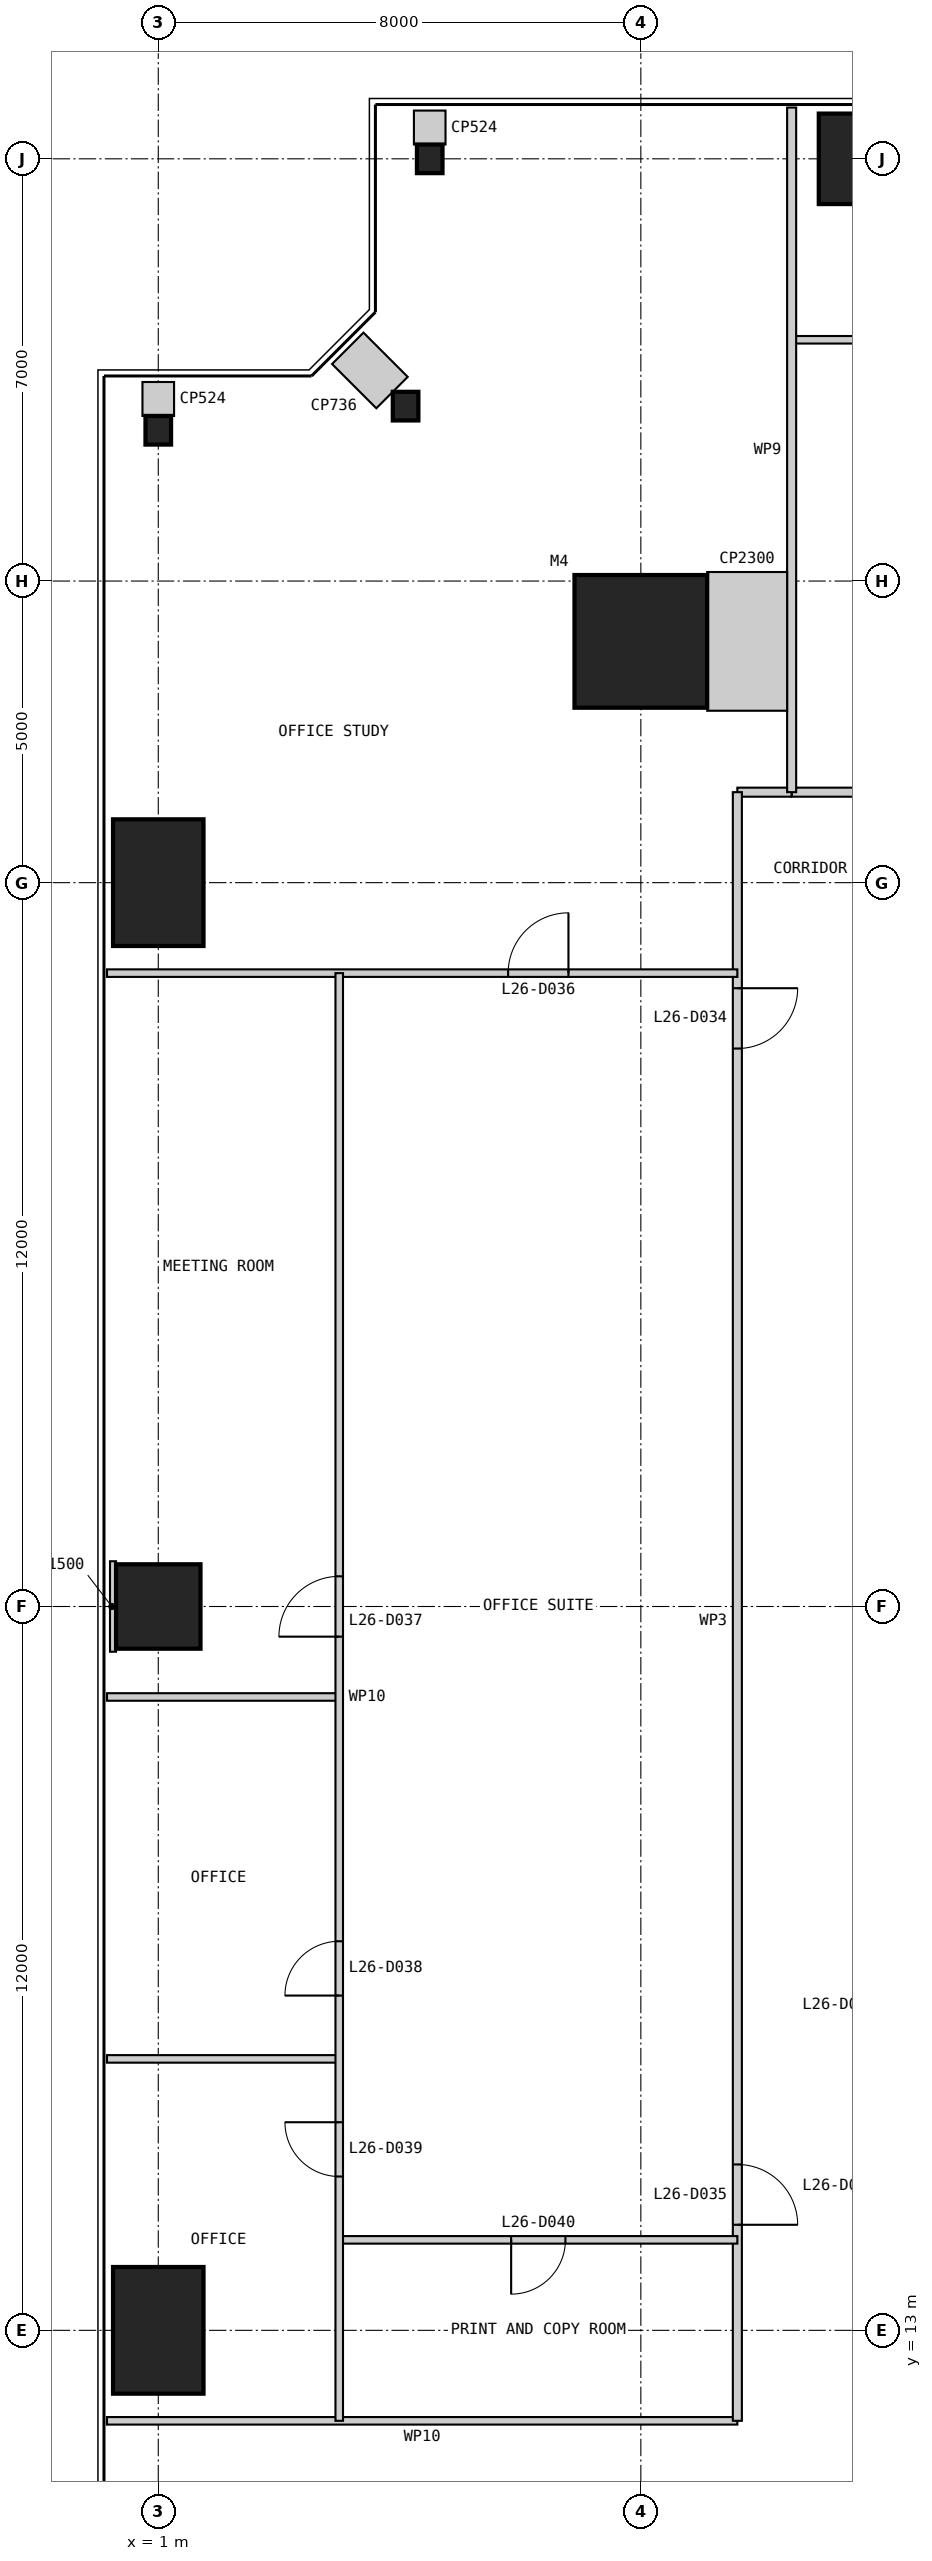
"""IFC4 building model, lengths in metres.
Left out: names, types, materials, properties, quantities, classifications, styles, units other than length and angle.
Written with IfcOpenShell. Run it as: python <this file> out.ifc"""

import sys

from ifc_helpers import new_model, si_unit, direction, frame, frame_2d, origin, origin_2d, place, context, subcontext, project, spatial, rectangle, i_section, extrude, element, fill, save


model = new_model("IFC4")
c1 = context("Model", 3, precision=1e-05, world=origin(), true_north=direction((0.0, 1.0)))
c2 = subcontext(c1, "Body", "Model", "MODEL_VIEW")
j1 = project(units=[si_unit("LENGTHUNIT", "METRE"), si_unit("PLANEANGLEUNIT", "RADIAN")], contexts=[c1])
p1 = place(None, origin())
s1 = spatial("IfcSite", under=j1, at=p1, CompositionType="ELEMENT")
p2 = place(p1, origin())
s2 = spatial("IfcBuilding", under=s1, at=p2, CompositionType="ELEMENT")
p3 = place(p2, frame((0.0, 0.0, 114.4)))
s3 = spatial("IfcBuildingStorey", under=s2, at=p3, CompositionType="ELEMENT", Elevation=114.4)
p4 = place(p3, frame((9.0, 41.0, 0.0), z_axis=(0.0, 0.0, 1.0), x_axis=(1.0, 0.0, 0.0)))
e1 = element("IfcColumn", 1, at=p4, inside=s3, PredefinedType="COLUMN", context=c2, shape_type="SweptSolid", body=[
    extrude(rectangle(XDim=2.2, YDim=2.2, at=origin_2d()), origin(), (0.0, 0.0, 1.0), 4.0),
])
p5 = place(p3, frame((13.0, 49.0, 0.0), z_axis=(0.0, 0.0, 1.0), x_axis=(1.0, 0.0, 0.0)))
e2 = element("IfcColumn", 2, at=p5, inside=s3, PredefinedType="COLUMN", context=c2, shape_type="SweptSolid", body=[
    extrude(rectangle(XDim=2.1, YDim=1.5, at=origin_2d()), origin(), (0.0, 0.0, 1.0), 4.0),
])
for number, where, z_axis, x_axis in (
    (3, (5.5, 49.0, 0.0), (0.0, 0.0, 1.0), (1.0, 0.0, 0.0)),
    (4, (5.1, 44.9, 0.0), (0.0, 0.0, 1.0), (1.0, 0.0, 0.0)),
    (5, (1.0, 44.5, 0.0), (0.0, 0.0, 1.0), (1.0, 0.0, 0.0)),
):
    element("IfcColumn", number, at=place(p3, frame(where, z_axis=z_axis, x_axis=x_axis)), inside=s3, PredefinedType="COLUMN", context=c2, shape_type="SweptSolid", body=[
        extrude(i_section(OverallWidth=0.424, OverallDepth=0.475, WebThickness=0.048, FlangeThickness=0.077, at=origin_2d()), origin(), (0.0, 0.0, 1.0), 4.0),
    ])
p6 = place(p3, frame((1.0, 37.0, 0.0), z_axis=(0.0, 0.0, 1.0), x_axis=(1.0, 0.0, 0.0)))
e6 = element("IfcColumn", 6, at=p6, inside=s3, PredefinedType="COLUMN", context=c2, shape_type="SweptSolid", body=[
    extrude(rectangle(XDim=1.5, YDim=2.1, at=origin_2d()), origin(), (0.0, 0.0, 1.0), 4.0),
])
p7 = place(p3, frame((1.0, 25.0, 0.0), z_axis=(0.0, 0.0, 1.0), x_axis=(1.0, 0.0, 0.0)))
e7 = element("IfcColumn", 7, at=p7, inside=s3, PredefinedType="COLUMN", context=c2, shape_type="SweptSolid", body=[
    extrude(rectangle(XDim=1.4, YDim=1.4, at=origin_2d()), origin(), (0.0, 0.0, 1.0), 4.0),
])
p8 = place(p3, frame((1.0, 13.0, 0.0), z_axis=(0.0, 0.0, 1.0), x_axis=(1.0, 0.0, 0.0)))
e8 = element("IfcColumn", 8, at=p8, inside=s3, PredefinedType="COLUMN", context=c2, shape_type="SweptSolid", body=[
    extrude(rectangle(XDim=1.5, YDim=2.1, at=origin_2d()), origin(), (0.0, 0.0, 1.0), 4.0),
])
p9 = place(p3, frame((0.15, 11.5, 0.0), z_axis=(0.0, 0.0, 1.0), x_axis=(1.0, 0.0, 0.0)))
e9 = element("IfcWall", 9, at=p9, inside=s3, PredefinedType="PARTITIONING", context=c2, shape_type="SweptSolid", body=[
    extrude(rectangle(XDim=10.45, YDim=0.125, at=frame_2d((5.225, 0.0))), origin(), (0.0, 0.0, 1.0), 3.85),
])
p10 = place(p3, frame((38.5, 38.5, 0.0), z_axis=(0.0, 0.0, 1.0), x_axis=(-1.0, 0.0, 0.0)))
e10 = element("IfcWall", 10, at=p10, inside=s3, PredefinedType="PARTITIONING", context=c2, shape_type="SweptSolid", body=[
    extrude(rectangle(XDim=27.0, YDim=0.15, at=frame_2d((13.5, 0.0))), origin(), (0.0, 0.0, 1.0), 3.85),
])
p11 = place(p10, frame((2.5, 0.0, 0.0)))
e11 = element("IfcOpeningElement", 11, at=p11, cuts=e10, PredefinedType="OPENING", context=c2, shape_type="SweptSolid", body=[
    extrude(rectangle(XDim=1.0, YDim=2.2, at=frame_2d((0.5, 1.1))), frame((0.0, 0.085, 0.0), z_axis=(0.0, -1.0, 0.0), x_axis=(1.0, 0.0, 0.0)), (0.0, 0.0, 1.0), 0.17),
])
p12 = place(p10, frame((16.0, 0.0, 0.0)))
e12 = element("IfcOpeningElement", 12, at=p12, cuts=e10, PredefinedType="OPENING", context=c2, shape_type="SweptSolid", body=[
    extrude(rectangle(XDim=1.0, YDim=2.2, at=frame_2d((0.5, 1.1))), frame((0.0, 0.085, 0.0), z_axis=(0.0, -1.0, 0.0), x_axis=(1.0, 0.0, 0.0)), (0.0, 0.0, 1.0), 0.17),
])
p13 = place(p3, frame((17.5, 46.0, 0.0), z_axis=(0.0, 0.0, 1.0), x_axis=(-1.0, 0.0, 0.0)))
e13 = element("IfcWall", 13, at=p13, inside=s3, PredefinedType="PARTITIONING", context=c2, shape_type="SweptSolid", body=[
    extrude(rectangle(XDim=6.0, YDim=0.125, at=frame_2d((3.0, 0.0))), origin(), (0.0, 0.0, 1.0), 3.85),
])
p14 = place(p3, frame((11.5, 38.5, 0.0), z_axis=(0.0, 0.0, 1.0), x_axis=(-1.0, 0.0, 0.0)))
e14 = element("IfcWall", 14, at=p14, inside=s3, PredefinedType="PARTITIONING", context=c2, shape_type="SweptSolid", body=[
    extrude(rectangle(XDim=0.9, YDim=0.15, at=frame_2d((0.45, 0.0))), origin(), (0.0, 0.0, 1.0), 3.85),
])
p15 = place(p3, frame((10.6, 38.5, 0.0), z_axis=(0.0, 0.0, 1.0), x_axis=(0.0, -1.0, 0.0)))
e15 = element("IfcWall", 15, at=p15, inside=s3, PredefinedType="PARTITIONING", context=c2, shape_type="SweptSolid", body=[
    extrude(rectangle(XDim=27.0, YDim=0.15, at=frame_2d((13.5, 0.0))), origin(), (0.0, 0.0, 1.0), 3.85),
])
p16 = place(p15, frame((3.25, 0.0, 0.0)))
e16 = element("IfcOpeningElement", 16, at=p16, cuts=e15, PredefinedType="OPENING", context=c2, shape_type="SweptSolid", body=[
    extrude(rectangle(XDim=1.0, YDim=2.2, at=frame_2d((0.5, 1.1))), frame((0.0, 0.085, 0.0), z_axis=(0.0, -1.0, 0.0), x_axis=(1.0, 0.0, 0.0)), (0.0, 0.0, 1.0), 0.17),
])
p17 = place(p15, frame((22.75, 0.0, 0.0)))
e17 = element("IfcOpeningElement", 17, at=p17, cuts=e15, PredefinedType="OPENING", context=c2, shape_type="SweptSolid", body=[
    extrude(rectangle(XDim=1.0, YDim=2.2, at=frame_2d((0.5, 1.1))), frame((0.0, 0.085, 0.0), z_axis=(0.0, -1.0, 0.0), x_axis=(1.0, 0.0, 0.0)), (0.0, 0.0, 1.0), 0.17),
])
p18 = place(p3, frame((11.5, 49.85, 0.0), z_axis=(0.0, 0.0, 1.0), x_axis=(0.0, -1.0, 0.0)))
e18 = element("IfcWall", 18, at=p18, inside=s3, PredefinedType="PARTITIONING", context=c2, shape_type="SweptSolid", body=[
    extrude(rectangle(XDim=11.35, YDim=0.15, at=frame_2d((5.675, 0.0))), origin(), (0.0, 0.0, 1.0), 3.85),
])
p19 = place(p3, frame((0.15, 35.5, 0.0), z_axis=(0.0, 0.0, 1.0), x_axis=(1.0, 0.0, 0.0)))
e19 = element("IfcWall", 19, at=p19, inside=s3, PredefinedType="PARTITIONING", context=c2, shape_type="SweptSolid", body=[
    extrude(rectangle(XDim=10.45, YDim=0.125, at=frame_2d((5.225, 0.0))), origin(), (0.0, 0.0, 1.0), 3.85),
])
p20 = place(p19, frame((6.65, 0.0, 0.0)))
e20 = element("IfcOpeningElement", 20, at=p20, cuts=e19, PredefinedType="OPENING", context=c2, shape_type="SweptSolid", body=[
    extrude(rectangle(XDim=1.0, YDim=2.2, at=frame_2d((0.5, 1.1))), frame((0.0, 0.073, 0.0), z_axis=(0.0, -1.0, 0.0), x_axis=(1.0, 0.0, 0.0)), (0.0, 0.0, 1.0), 0.145),
])
for number, where, z_axis, x_axis in (
    (21, (0.15, 23.5, 0.0), (0.0, 0.0, 1.0), (1.0, 0.0, 0.0)),
    (22, (0.15, 17.5, 0.0), (0.0, 0.0, 1.0), (1.0, 0.0, 0.0)),
):
    element("IfcWall", number, at=place(p3, frame(where, z_axis=z_axis, x_axis=x_axis)), inside=s3, PredefinedType="PARTITIONING", context=c2, shape_type="SweptSolid", body=[
        extrude(rectangle(XDim=3.85, YDim=0.125, at=frame_2d((1.925, 0.0))), origin(), (0.0, 0.0, 1.0), 3.85),
    ])
p21 = place(p3, frame((4.0, 14.5, 0.0), z_axis=(0.0, 0.0, 1.0), x_axis=(1.0, 0.0, 0.0)))
e23 = element("IfcWall", 23, at=p21, inside=s3, PredefinedType="PARTITIONING", context=c2, shape_type="SweptSolid", body=[
    extrude(rectangle(XDim=6.6, YDim=0.125, at=frame_2d((3.3, 0.0))), origin(), (0.0, 0.0, 1.0), 3.85),
])
p22 = place(p21, frame((2.85, 0.0, 0.0)))
e24 = element("IfcOpeningElement", 24, at=p22, cuts=e23, PredefinedType="OPENING", context=c2, shape_type="SweptSolid", body=[
    extrude(rectangle(XDim=0.9, YDim=2.2, at=frame_2d((0.45, 1.1))), frame((0.0, 0.073, 0.0), z_axis=(0.0, -1.0, 0.0), x_axis=(1.0, 0.0, 0.0)), (0.0, 0.0, 1.0), 0.145),
])
p23 = place(p3, frame((4.0, 35.5, 0.0), z_axis=(0.0, 0.0, 1.0), x_axis=(0.0, -1.0, 0.0)))
e25 = element("IfcWall", 25, at=p23, inside=s3, PredefinedType="PARTITIONING", context=c2, shape_type="SweptSolid", body=[
    extrude(rectangle(XDim=24.0, YDim=0.125, at=frame_2d((12.0, 0.0))), origin(), (0.0, 0.0, 1.0), 3.238),
])
p24 = place(p23, frame((10.0, 0.0, 0.0)))
e26 = element("IfcOpeningElement", 26, at=p24, cuts=e25, PredefinedType="OPENING", context=c2, shape_type="SweptSolid", body=[
    extrude(rectangle(XDim=1.0, YDim=2.2, at=frame_2d((0.5, 1.1))), frame((0.0, 0.073, 0.0), z_axis=(0.0, -1.0, 0.0), x_axis=(1.0, 0.0, 0.0)), (0.0, 0.0, 1.0), 0.145),
])
p25 = place(p23, frame((16.05, 0.0, 0.0)))
e27 = element("IfcOpeningElement", 27, at=p25, cuts=e25, PredefinedType="OPENING", context=c2, shape_type="SweptSolid", body=[
    extrude(rectangle(XDim=0.9, YDim=2.2, at=frame_2d((0.45, 1.1))), frame((0.0, 0.073, 0.0), z_axis=(0.0, -1.0, 0.0), x_axis=(1.0, 0.0, 0.0)), (0.0, 0.0, 1.0), 0.145),
])
p26 = place(p23, frame((19.05, 0.0, 0.0)))
e28 = element("IfcOpeningElement", 28, at=p26, cuts=e25, PredefinedType="OPENING", context=c2, shape_type="SweptSolid", body=[
    extrude(rectangle(XDim=0.9, YDim=2.2, at=frame_2d((0.45, 1.1))), frame((0.0, 0.073, 0.0), z_axis=(0.0, -1.0, 0.0), x_axis=(1.0, 0.0, 0.0)), (0.0, 0.0, 1.0), 0.145),
])
p27 = place(p3, frame((11.425, 41.0, 0.0), z_axis=(0.0, 0.0, 1.0), x_axis=(-1.0, 0.0, 0.0)))
e29 = element("IfcWall", 29, at=p27, inside=s3, PredefinedType="PARTITIONING", context=c2, shape_type="SweptSolid", body=[
    extrude(rectangle(XDim=1.325, YDim=2.3, at=frame_2d((0.663, 0.0))), origin(), (0.0, 0.0, 1.0), 3.85),
])
p28 = place(p3, frame((5.5, 49.8, 0.0), z_axis=(0.0, 0.0, 1.0), x_axis=(0.0, -1.0, 0.0)))
e30 = element("IfcWall", 30, at=p28, inside=s3, PredefinedType="PARTITIONING", context=c2, shape_type="SweptSolid", body=[
    extrude(rectangle(XDim=0.562, YDim=0.524, at=frame_2d((0.281, 0.0))), origin(), (0.0, 0.0, 1.0), 3.85),
])
p29 = place(p3, frame((4.141, 45.859, 0.0), z_axis=(0.0, 0.0, 1.0), x_axis=(0.707106781187, -0.707106781187, 0.0)))
e31 = element("IfcWall", 31, at=p29, inside=s3, PredefinedType="PARTITIONING", context=c2, shape_type="SweptSolid", body=[
    extrude(rectangle(XDim=1.038, YDim=0.736, at=frame_2d((0.519, 0.0))), origin(), (0.0, 0.0, 1.0), 3.85),
])
p30 = place(p3, frame((1.0, 45.3, 0.0), z_axis=(0.0, 0.0, 1.0), x_axis=(0.0, -1.0, 0.0)))
e32 = element("IfcWall", 32, at=p30, inside=s3, PredefinedType="PARTITIONING", context=c2, shape_type="SweptSolid", body=[
    extrude(rectangle(XDim=0.562, YDim=0.524, at=frame_2d((0.281, 0.0))), origin(), (0.0, 0.0, 1.0), 3.85),
])
p31 = place(p3, frame((0.2, 25.0, 0.0), z_axis=(0.0, 0.0, 1.0), x_axis=(1.0, 0.0, 0.0)))
e33 = element("IfcWall", 33, at=p31, inside=s3, PredefinedType="PARTITIONING", context=c2, shape_type="SweptSolid", body=[
    extrude(rectangle(XDim=0.1, YDim=1.5, at=frame_2d((0.05, 0.0))), origin(), (0.0, 0.0, 1.0), 3.85),
])
p32 = place(p16, origin())
e34 = element("IfcDoor", 34, at=p32, inside=s3, OperationType="SINGLE_SWING_LEFT", PredefinedType="DOOR", context=c2, shape_type="SweptSolid", body=[
    extrude(rectangle(XDim=1.0, YDim=2.2, at=frame_2d((0.5, 1.1))), frame((0.0, 0.025, 0.0), z_axis=(0.0, -1.0, 0.0), x_axis=(1.0, 0.0, 0.0)), (0.0, 0.0, 1.0), 0.05),
])
fill(e16, e34)
p33 = place(p17, origin())
e35 = element("IfcDoor", 35, at=p33, inside=s3, OperationType="SINGLE_SWING_RIGHT", PredefinedType="DOOR", context=c2, shape_type="SweptSolid", body=[
    extrude(rectangle(XDim=1.0, YDim=2.2, at=frame_2d((0.5, 1.1))), frame((0.0, 0.025, 0.0), z_axis=(0.0, -1.0, 0.0), x_axis=(1.0, 0.0, 0.0)), (0.0, 0.0, 1.0), 0.05),
])
fill(e17, e35)
p34 = place(p20, origin())
e36 = element("IfcDoor", 36, at=p34, inside=s3, OperationType="SINGLE_SWING_RIGHT", PredefinedType="DOOR", context=c2, shape_type="SweptSolid", body=[
    extrude(rectangle(XDim=1.0, YDim=2.2, at=frame_2d((0.5, 1.1))), frame((0.0, 0.025, 0.0), z_axis=(0.0, -1.0, 0.0), x_axis=(1.0, 0.0, 0.0)), (0.0, 0.0, 1.0), 0.05),
])
fill(e20, e36)
p35 = place(p24, frame((1.0, 0.0, 0.0), z_axis=(0.0, 0.0, 1.0), x_axis=(-1.0, 0.0, 0.0)))
e37 = element("IfcDoor", 37, at=p35, inside=s3, OperationType="SINGLE_SWING_LEFT", PredefinedType="DOOR", context=c2, shape_type="SweptSolid", body=[
    extrude(rectangle(XDim=1.0, YDim=2.2, at=frame_2d((0.5, 1.1))), frame((0.0, 0.025, 0.0), z_axis=(0.0, -1.0, 0.0), x_axis=(1.0, 0.0, 0.0)), (0.0, 0.0, 1.0), 0.05),
])
fill(e26, e37)
p36 = place(p25, frame((0.9, 0.0, 0.0), z_axis=(0.0, 0.0, 1.0), x_axis=(-1.0, 0.0, 0.0)))
e38 = element("IfcDoor", 38, at=p36, inside=s3, OperationType="SINGLE_SWING_LEFT", PredefinedType="DOOR", context=c2, shape_type="SweptSolid", body=[
    extrude(rectangle(XDim=0.9, YDim=2.2, at=frame_2d((0.45, 1.1))), frame((0.0, 0.025, 0.0), z_axis=(0.0, -1.0, 0.0), x_axis=(1.0, 0.0, 0.0)), (0.0, 0.0, 1.0), 0.05),
])
fill(e27, e38)
p37 = place(p26, frame((0.9, 0.0, 0.0), z_axis=(0.0, 0.0, 1.0), x_axis=(-1.0, 0.0, 0.0)))
e39 = element("IfcDoor", 39, at=p37, inside=s3, OperationType="SINGLE_SWING_RIGHT", PredefinedType="DOOR", context=c2, shape_type="SweptSolid", body=[
    extrude(rectangle(XDim=0.9, YDim=2.2, at=frame_2d((0.45, 1.1))), frame((0.0, 0.025, 0.0), z_axis=(0.0, -1.0, 0.0), x_axis=(1.0, 0.0, 0.0)), (0.0, 0.0, 1.0), 0.05),
])
fill(e28, e39)
p38 = place(p22, frame((0.9, 0.0, 0.0), z_axis=(0.0, 0.0, 1.0), x_axis=(-1.0, 0.0, 0.0)))
e40 = element("IfcDoor", 40, at=p38, inside=s3, OperationType="SINGLE_SWING_RIGHT", PredefinedType="DOOR", context=c2, shape_type="SweptSolid", body=[
    extrude(rectangle(XDim=0.9, YDim=2.2, at=frame_2d((0.45, 1.1))), frame((0.0, 0.025, 0.0), z_axis=(0.0, -1.0, 0.0), x_axis=(1.0, 0.0, 0.0)), (0.0, 0.0, 1.0), 0.05),
])
fill(e24, e40)
save(model, sys.argv[1])
